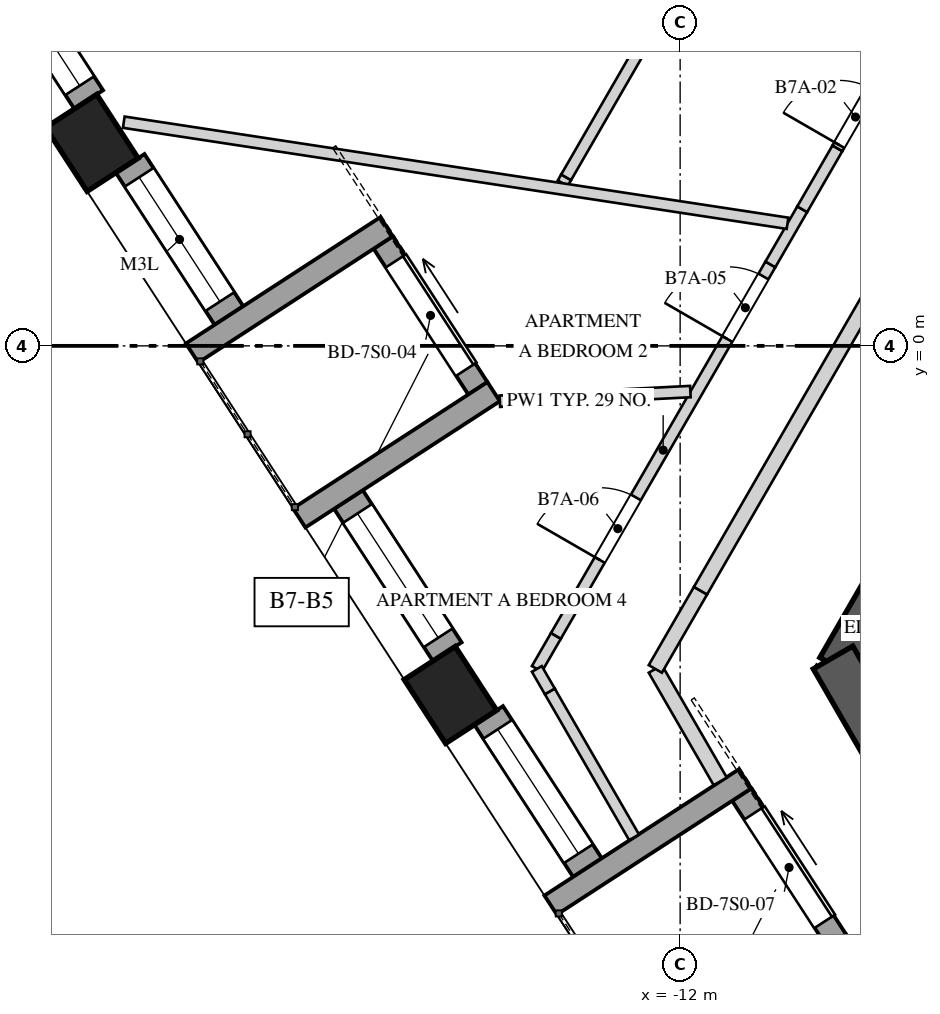
"""IFC4 building model, lengths in metres.
Left out: names, types, materials, properties, quantities, classifications, styles, units other than length and angle.
Written with IfcOpenShell. Run it as: python <this file> out.ifc"""

import sys

from ifc_helpers import new_model, si_unit, direction, frame, frame_2d, origin, origin_2d, place, context, subcontext, project, spatial, polyline, rectangle, outline, extrude, element, fill, save


model = new_model("IFC4")
c1 = context("Model", 3, precision=1e-05, world=origin(), true_north=direction((0.0, 1.0)))
c2 = subcontext(c1, "Body", "Model", "MODEL_VIEW")
j1 = project(units=[si_unit("LENGTHUNIT", "METRE"), si_unit("PLANEANGLEUNIT", "RADIAN")], contexts=[c1])
p1 = place(None, origin())
s1 = spatial("IfcSite", under=j1, at=p1, CompositionType="ELEMENT")
p2 = place(p1, origin())
s2 = spatial("IfcBuilding", under=s1, at=p2, CompositionType="ELEMENT")
p3 = place(p2, frame((0.0, 0.0, 274.4)))
s3 = spatial("IfcBuildingStorey", under=s2, at=p3, CompositionType="ELEMENT", Elevation=274.4)
p4 = place(p3, frame((-1.27, 10.7, 0.0), z_axis=(0.0, 0.0, 1.0), x_axis=(-0.499999536116, -0.866025671608, 0.0)))
e1 = element("IfcWall", 1, at=p4, inside=s3, PredefinedType="SHEAR", context=c2, shape_type="SweptSolid", body=[
    extrude(rectangle(XDim=17.263, YDim=0.6, at=frame_2d((8.631, 0.0))), origin(), (0.0, 0.0, 1.0), 4.0),
])
p5 = place(p4, frame((6.836, 0.0, 0.0)))
e2 = element("IfcOpeningElement", 2, at=p5, cuts=e1, PredefinedType="OPENING", context=c2, shape_type="SweptSolid", body=[
    extrude(rectangle(XDim=1.0, YDim=2.4, at=frame_2d((0.5, 1.2))), frame((0.0, 0.31, 0.0), z_axis=(0.0, -1.0, 0.0), x_axis=(1.0, 0.0, 0.0)), (0.0, 0.0, 1.0), 0.62),
])
p6 = place(p4, frame((15.034, 0.0, 0.0)))
e3 = element("IfcOpeningElement", 3, at=p6, cuts=e1, PredefinedType="OPENING", context=c2, shape_type="SweptSolid", body=[
    extrude(rectangle(XDim=0.8, YDim=2.1, at=frame_2d((0.4, 1.05))), frame((0.0, 0.31, 0.0), z_axis=(0.0, -1.0, 0.0), x_axis=(1.0, 0.0, 0.0)), (0.0, 0.0, 1.0), 0.62),
])
p7 = place(p3, frame((-9.988, -4.1, 0.0), z_axis=(0.0, 0.0, 1.0), x_axis=(0.499995765644, -0.866027848477, 0.0)))
e4 = element("IfcWall", 4, at=p7, inside=s3, PredefinedType="SHEAR", context=c2, shape_type="SweptSolid", body=[
    extrude(rectangle(XDim=2.887, YDim=0.6, at=frame_2d((1.443, 0.0))), origin(), (0.0, 0.0, 1.0), 4.0),
])
for number, where, z_axis, x_axis in (
    (5, (-19.739, 2.671, -0.35), (0.0, 0.0, 1.0), (0.545, -0.839, 0.0)),
    (6, (-15.022, -4.593, -0.35), (0.0, 0.0, 1.0), (0.545, -0.839, 0.0)),
):
    element("IfcColumn", number, at=place(p3, frame(where, z_axis=z_axis, x_axis=x_axis)), inside=s3, PredefinedType="COLUMN", context=c2, shape_type="SweptSolid", body=[
        extrude(rectangle(XDim=1.0, YDim=0.8, at=origin_2d()), origin(), (0.0, 0.0, 1.0), 4.35),
    ])
p8 = place(p3, frame((-23.626, 9.161, 0.0), z_axis=(0.0, 0.0, 1.0), x_axis=(0.54463703186, -0.838671868806, 0.0)))
e7 = element("IfcWall", 7, at=p8, inside=s3, PredefinedType="SOLIDWALL", context=c2, shape_type="SweptSolid", body=[
    extrude(rectangle(XDim=7.06, YDim=0.45, at=frame_2d((3.53, 0.0))), origin(), (0.0, 0.0, 1.0), 3.3),
])
p9 = place(p8, frame((0.293, 0.0, 0.4)))
e8 = element("IfcOpeningElement", 8, at=p9, cuts=e7, PredefinedType="OPENING", context=c2, shape_type="SweptSolid", body=[
    extrude(rectangle(XDim=1.2, YDim=2.1, at=frame_2d((0.6, 1.05))), frame((0.0, 0.235, 0.0), z_axis=(0.0, -1.0, 0.0), x_axis=(1.0, 0.0, 0.0)), (0.0, 0.0, 1.0), 0.47),
])
p10 = place(p8, frame((2.255, 0.0, 0.4)))
e9 = element("IfcOpeningElement", 9, at=p10, cuts=e7, PredefinedType="OPENING", context=c2, shape_type="SweptSolid", body=[
    extrude(rectangle(XDim=1.95, YDim=2.75, at=frame_2d((0.975, 1.375))), frame((0.0, 0.235, 0.0), z_axis=(0.0, -1.0, 0.0), x_axis=(1.0, 0.0, 0.0)), (0.0, 0.0, 1.0), 0.47),
])
p11 = place(p8, frame((4.892, 0.0, 0.4)))
e10 = element("IfcOpeningElement", 10, at=p11, cuts=e7, PredefinedType="OPENING", context=c2, shape_type="SweptSolid", body=[
    extrude(rectangle(XDim=1.95, YDim=2.75, at=frame_2d((0.975, 1.375))), frame((0.0, 0.235, 0.0), z_axis=(0.0, -1.0, 0.0), x_axis=(1.0, 0.0, 0.0)), (0.0, 0.0, 1.0), 0.47),
])
p12 = place(p3, frame((-19.236, 2.401, 0.0), z_axis=(0.0, 0.0, 1.0), x_axis=(0.544675520966, -0.838646872563, 0.0)))
e11 = element("IfcWall", 11, at=p12, inside=s3, PredefinedType="SOLIDWALL", context=c2, shape_type="SweptSolid", body=[
    extrude(rectangle(XDim=2.387, YDim=0.45, at=frame_2d((1.193, 0.0))), origin(), (0.0, 0.0, 1.0), 3.3),
])
p13 = place(p12, frame((0.218, 0.0, 0.4)))
e12 = element("IfcOpeningElement", 12, at=p13, cuts=e11, PredefinedType="OPENING", context=c2, shape_type="SweptSolid", body=[
    extrude(rectangle(XDim=1.95, YDim=2.1, at=frame_2d((0.975, 1.05))), frame((0.0, 0.235, 0.0), z_axis=(0.0, -1.0, 0.0), x_axis=(1.0, 0.0, 0.0)), (0.0, 0.0, 1.0), 0.47),
])
p14 = place(p3, frame((-16.364, -2.022, 0.0), z_axis=(0.0, 0.0, 1.0), x_axis=(0.544603573947, -0.838693595566, 0.0)))
e13 = element("IfcWall", 13, at=p14, inside=s3, PredefinedType="SOLIDWALL", context=c2, shape_type="SweptSolid", body=[
    extrude(rectangle(XDim=2.387, YDim=0.45, at=frame_2d((1.193, 0.0))), origin(), (0.0, 0.0, 1.0), 3.3),
])
p15 = place(p14, frame((0.218, 0.0, 0.4)))
e14 = element("IfcOpeningElement", 14, at=p15, cuts=e13, PredefinedType="OPENING", context=c2, shape_type="SweptSolid", body=[
    extrude(rectangle(XDim=1.95, YDim=2.75, at=frame_2d((0.975, 1.375))), frame((0.0, 0.235, 0.0), z_axis=(0.0, -1.0, 0.0), x_axis=(1.0, 0.0, 0.0)), (0.0, 0.0, 1.0), 0.47),
])
p16 = place(p3, frame((-14.519, -4.862, 0.0), z_axis=(0.0, 0.0, 1.0), x_axis=(0.544603573947, -0.838693595566, 0.0)))
e15 = element("IfcWall", 15, at=p16, inside=s3, PredefinedType="SOLIDWALL", context=c2, shape_type="SweptSolid", body=[
    extrude(rectangle(XDim=2.387, YDim=0.45, at=frame_2d((1.193, 0.0))), origin(), (0.0, 0.0, 1.0), 3.3),
])
p17 = place(p16, frame((0.218, 0.0, 0.4)))
e16 = element("IfcOpeningElement", 16, at=p17, cuts=e15, PredefinedType="OPENING", context=c2, shape_type="SweptSolid", body=[
    extrude(rectangle(XDim=1.95, YDim=2.75, at=frame_2d((0.975, 1.375))), frame((0.0, 0.235, 0.0), z_axis=(0.0, -1.0, 0.0), x_axis=(1.0, 0.0, 0.0)), (0.0, 0.0, 1.0), 0.47),
])
p18 = place(p3, frame((-15.907, 1.36, 0.0), z_axis=(0.0, 0.0, 1.0), x_axis=(0.544658103125, -0.838658184662, 0.0)))
e17 = element("IfcWall", 17, at=p18, inside=s3, PredefinedType="SOLIDWALL", context=c2, shape_type="SweptSolid", body=[
    extrude(rectangle(XDim=2.287, YDim=0.3, at=frame_2d((1.144, 0.0))), origin(), (0.0, 0.0, 1.0), 3.3),
])
p19 = place(p18, frame((0.293, 0.0, 0.0)))
e18 = element("IfcOpeningElement", 18, at=p19, cuts=e17, PredefinedType="OPENING", context=c2, shape_type="SweptSolid", body=[
    extrude(rectangle(XDim=1.7, YDim=2.5, at=frame_2d((0.85, 1.25))), frame((0.0, 0.16, 0.0), z_axis=(0.0, -1.0, 0.0), x_axis=(1.0, 0.0, 0.0)), (0.0, 0.0, 1.0), 0.32),
])
for number, where, z_axis, x_axis in (
    (19, (-18.42, -0.094, 0.0), (0.0, 0.0, 1.0), (0.839, 0.545, 0.0)),
    (20, (-17.012, -2.263, 0.0), (0.0, 0.0, 1.0), (0.839, 0.545, 0.0)),
):
    element("IfcWall", number, at=place(p3, frame(where, z_axis=z_axis, x_axis=x_axis)), inside=s3, PredefinedType="SOLIDWALL", context=c2, shape_type="SweptSolid", body=[
        extrude(rectangle(XDim=3.05, YDim=0.3, at=frame_2d((1.525, 0.0))), origin(), (0.0, 0.0, 1.0), 3.3),
    ])
p20 = place(p3, frame((-11.19, -5.904, 0.0), z_axis=(0.0, 0.0, 1.0), x_axis=(0.544631777146, -0.838675281216, 0.0)))
e21 = element("IfcWall", 21, at=p20, inside=s3, PredefinedType="SOLIDWALL", context=c2, shape_type="SweptSolid", body=[
    extrude(rectangle(XDim=2.287, YDim=0.3, at=frame_2d((1.143, 0.0))), origin(), (0.0, 0.0, 1.0), 3.3),
])
p21 = place(p20, frame((0.293, 0.0, 0.0)))
e22 = element("IfcOpeningElement", 22, at=p21, cuts=e21, PredefinedType="OPENING", context=c2, shape_type="SweptSolid", body=[
    extrude(rectangle(XDim=1.7, YDim=2.5, at=frame_2d((0.85, 1.25))), frame((0.0, 0.16, 0.0), z_axis=(0.0, -1.0, 0.0), x_axis=(1.0, 0.0, 0.0)), (0.0, 0.0, 1.0), 0.32),
])
p22 = place(p3, frame((-13.704, -7.357, 0.0), z_axis=(0.0, 0.0, 1.0), x_axis=(0.838688583525, 0.544611292451, 0.0)))
e23 = element("IfcWall", 23, at=p22, inside=s3, PredefinedType="SOLIDWALL", context=c2, shape_type="SweptSolid", body=[
    extrude(rectangle(XDim=3.05, YDim=0.3, at=frame_2d((1.525, 0.0))), origin(), (0.0, 0.0, 1.0), 3.3),
])
p23 = place(p3, frame((-12.295, -9.527, 0.0), z_axis=(0.0, 0.0, 1.0), x_axis=(0.838664840319, 0.544647854685, 0.0)))
e24 = element("IfcWall", 24, at=p23, inside=s3, PredefinedType="SOLIDWALL", context=c2, shape_type="SweptSolid", body=[
    extrude(rectangle(XDim=3.05, YDim=0.3, at=frame_2d((1.525, 0.0))), origin(), (0.0, 0.0, 1.0), 3.3),
])
p24 = place(p3, frame((-13.885, -4.25, 0.0), z_axis=(0.0, 0.0, 1.0), x_axis=(0.499904868165, 0.866080321209, 0.0)))
e25 = element("IfcWall", 25, at=p24, inside=s3, PredefinedType="PARTITIONING", context=c2, shape_type="SweptSolid", body=[
    extrude(rectangle(XDim=0.502, YDim=0.15, at=frame_2d((0.251, 0.0))), origin(), (0.0, 0.0, 1.0), 2.95),
])
p25 = place(p3, frame((-13.634, -3.815, 0.0), z_axis=(0.0, 0.0, 1.0), x_axis=(0.500005829693, 0.866022037983, 0.0)))
e26 = element("IfcWall", 26, at=p25, inside=s3, PredefinedType="PARTITIONING", context=c2, shape_type="SweptSolid", body=[
    extrude(rectangle(XDim=5.643, YDim=0.15, at=frame_2d((2.822, 0.0))), origin(), (0.0, 0.0, 1.0), 3.65),
])
p26 = place(p25, frame((4.51, 0.0, 0.0)))
e27 = element("IfcOpeningElement", 27, at=p26, cuts=e26, PredefinedType="OPENING", context=c2, shape_type="SweptSolid", body=[
    extrude(rectangle(XDim=0.95, YDim=2.4, at=frame_2d((0.475, 1.2))), frame((0.0, 0.085, 0.0), z_axis=(0.0, -1.0, 0.0), x_axis=(1.0, 0.0, 0.0)), (0.0, 0.0, 1.0), 0.17),
])
p27 = place(p25, frame((1.154, 0.0, 0.0)))
e28 = element("IfcOpeningElement", 28, at=p27, cuts=e26, PredefinedType="OPENING", context=c2, shape_type="SweptSolid", body=[
    extrude(rectangle(XDim=0.95, YDim=2.4, at=frame_2d((0.475, 1.2))), frame((0.0, 0.085, 0.0), z_axis=(0.0, -1.0, 0.0), x_axis=(1.0, 0.0, 0.0)), (0.0, 0.0, 1.0), 0.17),
])
p28 = place(p3, frame((-10.813, 1.072, 0.0), z_axis=(0.0, 0.0, 1.0), x_axis=(0.500025132165, 0.866010893236, 0.0)))
e29 = element("IfcWall", 29, at=p28, inside=s3, PredefinedType="PARTITIONING", context=c2, shape_type="SweptSolid", body=[
    extrude(rectangle(XDim=0.838, YDim=0.15, at=frame_2d((0.419, 0.0))), origin(), (0.0, 0.0, 1.0), 2.75),
])
p29 = place(p3, frame((-10.394, 1.797, 0.0), z_axis=(0.0, 0.0, 1.0), x_axis=(0.499996383721, 0.866027491634, 0.0)))
e30 = element("IfcWall", 30, at=p29, inside=s3, PredefinedType="PARTITIONING", context=c2, shape_type="SweptSolid", body=[
    extrude(rectangle(XDim=0.926, YDim=0.15, at=frame_2d((0.463, 0.0))), origin(), (0.0, 0.0, 1.0), 3.65),
])
p30 = place(p3, frame((-9.931, 2.599, 0.0), z_axis=(0.0, 0.0, 1.0), x_axis=(0.500056273262, 0.865992911964, 0.0)))
e31 = element("IfcWall", 31, at=p30, inside=s3, PredefinedType="PARTITIONING", context=c2, shape_type="SweptSolid", body=[
    extrude(outline(polyline([(0.0, 0.0), (1.709, 0.0), (1.709, 2.55), (0.825, 2.55), (0.825, 3.65), (0.0, 3.65), (0.0, 0.0)])), frame((0.0, 0.075, 0.0), z_axis=(0.0, -1.0, 0.0), x_axis=(1.0, 0.0, 0.0)), (0.0, 0.0, 1.0), 0.15),
])
p31 = place(p30, frame((0.05, 0.0, 0.0)))
e32 = element("IfcOpeningElement", 32, at=p31, cuts=e31, PredefinedType="OPENING", context=c2, shape_type="SweptSolid", body=[
    extrude(rectangle(XDim=0.85, YDim=2.4, at=frame_2d((0.425, 1.2))), frame((0.0, 0.085, 0.0), z_axis=(0.0, -1.0, 0.0), x_axis=(1.0, 0.0, 0.0)), (0.0, 0.0, 1.0), 0.17),
])
p32 = place(p3, frame((-13.545, 2.139, 0.0), z_axis=(0.0, 0.0, 1.0), x_axis=(0.499332966107, 0.866410173624, 0.0)))
e33 = element("IfcWall", 33, at=p32, inside=s3, PredefinedType="PARTITIONING", context=c2, shape_type="SweptSolid", body=[
    extrude(rectangle(XDim=0.09, YDim=0.15, at=frame_2d((0.045, 0.0))), origin(), (0.0, 0.0, 1.0), 2.75),
])
p33 = place(p3, frame((-13.5, 2.218, 0.0), z_axis=(0.0, 0.0, 1.0), x_axis=(0.500010832295, 0.866019149666, 0.0)))
e34 = element("IfcWall", 34, at=p33, inside=s3, PredefinedType="PARTITIONING", context=c2, shape_type="SweptSolid", body=[
    extrude(rectangle(XDim=2.516, YDim=0.15, at=frame_2d((1.258, 0.0))), origin(), (0.0, 0.0, 1.0), 3.65),
])
p34 = place(p3, frame((-12.606, -6.465, 0.0), z_axis=(0.0, 0.0, 1.0), x_axis=(-0.500024353964, 0.86601134256, 0.0)))
e35 = element("IfcWall", 35, at=p34, inside=s3, PredefinedType="PARTITIONING", context=c2, shape_type="SweptSolid", body=[
    extrude(rectangle(XDim=2.217, YDim=0.15, at=frame_2d((1.108, 0.0))), origin(), (0.0, 0.0, 1.0), 3.65),
])
p35 = place(p3, frame((-13.715, -4.546, 0.0), z_axis=(0.0, 0.0, 1.0), x_axis=(-0.499908181442, 0.866078408764, 0.0)))
e36 = element("IfcWall", 36, at=p35, inside=s3, PredefinedType="PARTITIONING", context=c2, shape_type="SweptSolid", body=[
    extrude(rectangle(XDim=0.341, YDim=0.15, at=frame_2d((0.171, 0.0))), origin(), (0.0, 0.0, 1.0), 2.95),
])
p36 = place(p3, frame((-11.865, -0.601, 0.0), z_axis=(0.0, 0.0, 1.0), x_axis=(-0.99871519822, -0.050674972563, 0.0)))
e37 = element("IfcWall", 37, at=p36, inside=s3, PredefinedType="PARTITIONING", context=c2, shape_type="SweptSolid", body=[
    extrude(rectangle(XDim=2.51, YDim=0.15, at=frame_2d((1.255, 0.0))), origin(), (0.0, 0.0, 1.0), 3.65),
])
p37 = place(p3, frame((-10.587, 1.613, 0.0), z_axis=(0.0, 0.0, 1.0), x_axis=(-0.988598095377, 0.150578238191, 0.0)))
e38 = element("IfcWall", 38, at=p37, inside=s3, PredefinedType="PARTITIONING", context=c2, shape_type="SweptSolid", body=[
    extrude(rectangle(XDim=8.833, YDim=0.15, at=frame_2d((4.417, 0.0))), origin(), (0.0, 0.0, 1.0), 2.75),
])
p38 = place(p3, frame((-11.472, -5.729, 0.0), z_axis=(0.0, 0.0, 1.0), x_axis=(-0.499982281718, 0.866035633198, 0.0)))
e39 = element("IfcWall", 39, at=p38, inside=s3, PredefinedType="SOLIDWALL", context=c2, shape_type="SweptSolid", body=[
    extrude(rectangle(XDim=1.708, YDim=0.2, at=frame_2d((0.854, 0.0))), origin(), (0.0, 0.0, 1.0), 3.65),
])
p39 = place(p3, frame((-12.326, -4.25, 0.0), z_axis=(0.0, 0.0, 1.0), x_axis=(0.499983247966, 0.86603507536, 0.0)))
e40 = element("IfcWall", 40, at=p39, inside=s3, PredefinedType="SOLIDWALL", context=c2, shape_type="SweptSolid", body=[
    extrude(rectangle(XDim=1.188, YDim=0.2, at=frame_2d((0.594, 0.0))), origin(), (0.0, 0.0, 1.0), 2.95),
])
p40 = place(p3, frame((-11.732, -3.221, 0.0), z_axis=(0.0, 0.0, 1.0), x_axis=(0.500007683529, 0.866020967652, 0.0)))
e41 = element("IfcWall", 41, at=p40, inside=s3, PredefinedType="SOLIDWALL", context=c2, shape_type="SweptSolid", body=[
    extrude(rectangle(XDim=4.717, YDim=0.2, at=frame_2d((2.359, 0.0))), origin(), (0.0, 0.0, 1.0), 3.65),
])
p41 = place(p11, origin())
e42 = element("IfcWindow", 42, at=p41, inside=s3, PartitioningType="SINGLE_PANEL", PredefinedType="WINDOW", context=c2, shape_type="SweptSolid", body=[
    extrude(rectangle(XDim=1.95, YDim=2.75, at=frame_2d((0.975, 1.375))), frame((0.0, 0.03, 0.0), z_axis=(0.0, -1.0, 0.0), x_axis=(1.0, 0.0, 0.0)), (0.0, 0.0, 1.0), 0.06),
])
fill(e10, e42)
p42 = place(p13, origin())
e43 = element("IfcWindow", 43, at=p42, inside=s3, PartitioningType="SINGLE_PANEL", PredefinedType="WINDOW", context=c2, shape_type="SweptSolid", body=[
    extrude(rectangle(XDim=1.95, YDim=2.1, at=frame_2d((0.975, 1.05))), frame((0.0, 0.03, 0.0), z_axis=(0.0, -1.0, 0.0), x_axis=(1.0, 0.0, 0.0)), (0.0, 0.0, 1.0), 0.06),
])
fill(e12, e43)
p43 = place(p15, origin())
e44 = element("IfcWindow", 44, at=p43, inside=s3, PartitioningType="SINGLE_PANEL", PredefinedType="WINDOW", context=c2, shape_type="SweptSolid", body=[
    extrude(rectangle(XDim=1.95, YDim=2.75, at=frame_2d((0.975, 1.375))), frame((0.0, 0.03, 0.0), z_axis=(0.0, -1.0, 0.0), x_axis=(1.0, 0.0, 0.0)), (0.0, 0.0, 1.0), 0.06),
])
fill(e14, e44)
p44 = place(p17, origin())
e45 = element("IfcWindow", 45, at=p44, inside=s3, PartitioningType="SINGLE_PANEL", PredefinedType="WINDOW", context=c2, shape_type="SweptSolid", body=[
    extrude(rectangle(XDim=1.95, YDim=2.75, at=frame_2d((0.975, 1.375))), frame((0.0, 0.03, 0.0), z_axis=(0.0, -1.0, 0.0), x_axis=(1.0, 0.0, 0.0)), (0.0, 0.0, 1.0), 0.06),
])
fill(e16, e45)
p45 = place(p19, origin())
e46 = element("IfcDoor", 46, at=p45, inside=s3, OperationType="SLIDING_TO_LEFT", PredefinedType="DOOR", context=c2, shape_type="SweptSolid", body=[
    extrude(rectangle(XDim=1.7, YDim=2.5, at=frame_2d((0.85, 1.25))), frame((0.0, 0.025, 0.0), z_axis=(0.0, -1.0, 0.0), x_axis=(1.0, 0.0, 0.0)), (0.0, 0.0, 1.0), 0.05),
])
fill(e18, e46)
p46 = place(p21, origin())
e47 = element("IfcDoor", 47, at=p46, inside=s3, OperationType="SLIDING_TO_LEFT", PredefinedType="DOOR", context=c2, shape_type="SweptSolid", body=[
    extrude(rectangle(XDim=1.7, YDim=2.5, at=frame_2d((0.85, 1.25))), frame((0.0, 0.025, 0.0), z_axis=(0.0, -1.0, 0.0), x_axis=(1.0, 0.0, 0.0)), (0.0, 0.0, 1.0), 0.05),
])
fill(e22, e47)
p47 = place(p31, origin())
e48 = element("IfcDoor", 48, at=p47, inside=s3, OperationType="SINGLE_SWING_RIGHT", PredefinedType="DOOR", context=c2, shape_type="SweptSolid", body=[
    extrude(rectangle(XDim=0.85, YDim=2.4, at=frame_2d((0.425, 1.2))), frame((0.0, 0.025, 0.0), z_axis=(0.0, -1.0, 0.0), x_axis=(1.0, 0.0, 0.0)), (0.0, 0.0, 1.0), 0.05),
])
fill(e32, e48)
p48 = place(p26, origin())
e49 = element("IfcDoor", 49, at=p48, inside=s3, OperationType="SINGLE_SWING_LEFT", PredefinedType="DOOR", context=c2, shape_type="SweptSolid", body=[
    extrude(rectangle(XDim=0.95, YDim=2.4, at=frame_2d((0.475, 1.2))), frame((0.0, 0.025, 0.0), z_axis=(0.0, -1.0, 0.0), x_axis=(1.0, 0.0, 0.0)), (0.0, 0.0, 1.0), 0.05),
])
fill(e27, e49)
p49 = place(p27, origin())
e50 = element("IfcDoor", 50, at=p49, inside=s3, OperationType="SINGLE_SWING_RIGHT", PredefinedType="DOOR", context=c2, shape_type="SweptSolid", body=[
    extrude(rectangle(XDim=0.95, YDim=2.4, at=frame_2d((0.475, 1.2))), frame((0.0, 0.025, 0.0), z_axis=(0.0, -1.0, 0.0), x_axis=(1.0, 0.0, 0.0)), (0.0, 0.0, 1.0), 0.05),
])
fill(e28, e50)
save(model, sys.argv[1])
